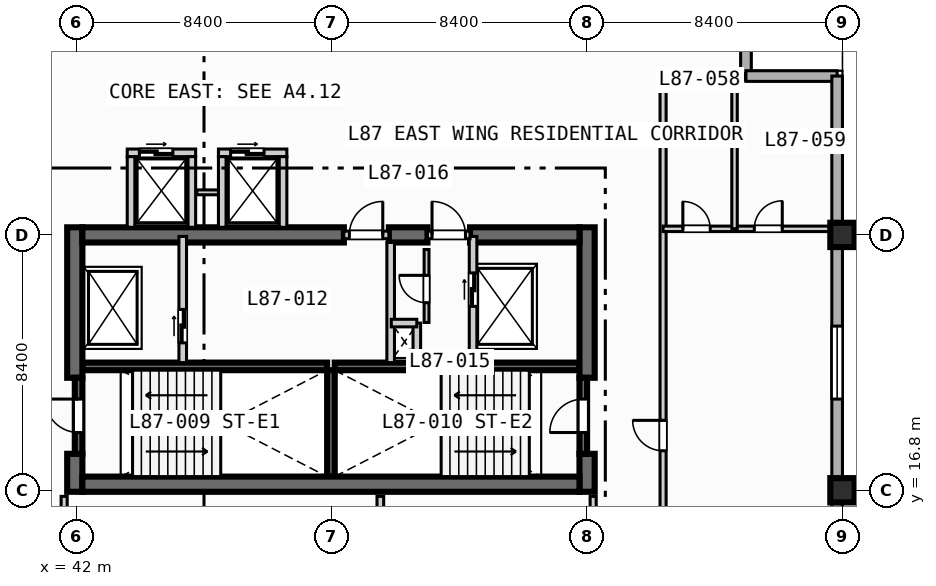
"""IFC4 building model, lengths in metres.
Left out: names, types, materials, properties, quantities, classifications, styles, units other than length and angle.
Written with IfcOpenShell. Run it as: python <this file> out.ifc"""

import sys

from ifc_helpers import new_model, si_unit, direction, frame, frame_2d, origin, origin_2d, place, context, subcontext, project, spatial, rectangle, extrude, element, fill, save


model = new_model("IFC4")
c1 = context("Model", 3, precision=1e-05, world=origin(), true_north=direction((0.0, 1.0)))
c2 = subcontext(c1, "Body", "Model", "MODEL_VIEW")
j1 = project(units=[si_unit("LENGTHUNIT", "METRE"), si_unit("PLANEANGLEUNIT", "RADIAN")], contexts=[c1])
p1 = place(None, origin())
s1 = spatial("IfcSite", under=j1, at=p1, CompositionType="ELEMENT")
p2 = place(p1, origin())
s2 = spatial("IfcBuilding", under=s1, at=p2, CompositionType="ELEMENT")
p3 = place(p2, frame((0.0, 0.0, 351.5)))
s3 = spatial("IfcBuildingStorey", under=s2, at=p3, CompositionType="ELEMENT", Elevation=351.5)
for number, where, z_axis, x_axis in (
    (1, (42.2, 20.875, 0.0), (0.0, 0.0, 1.0), (1.0, 0.0, 0.0)),
    (2, (50.5, 20.875, 0.0), (0.0, 0.0, 1.0), (1.0, 0.0, 0.0)),
):
    element("IfcWall", number, at=place(p3, frame(where, z_axis=z_axis, x_axis=x_axis)), inside=s3, PredefinedType="SOLIDWALL", context=c2, shape_type="SweptSolid", body=[
        extrude(rectangle(XDim=8.05, YDim=0.25, at=frame_2d((4.025, 0.0))), origin(), (0.0, 0.0, 1.0), 3.67),
    ])
p4 = place(p3, frame((50.375, 17.25, 0.0), z_axis=(0.0, 0.0, 1.0), x_axis=(0.0, 1.0, 0.0)))
e3 = element("IfcWall", 3, at=p4, inside=s3, PredefinedType="SOLIDWALL", context=c2, shape_type="SweptSolid", body=[
    extrude(rectangle(XDim=3.5, YDim=0.25, at=frame_2d((1.75, 0.0))), origin(), (0.0, 0.0, 1.0), 3.67),
])
p5 = place(p3, frame((41.95, 16.75, 0.0), z_axis=(0.0, 0.0, 1.0), x_axis=(0.0, 1.0, 0.0)))
e4 = element("IfcWall", 4, at=p5, inside=s3, PredefinedType="SHEAR", context=c2, shape_type="SweptSolid", body=[
    extrude(rectangle(XDim=1.25, YDim=0.5, at=frame_2d((0.625, 0.0))), origin(), (0.0, 0.0, 1.0), 3.67),
])
p6 = place(p3, frame((41.95, 20.5, 0.0), z_axis=(0.0, 0.0, 1.0), x_axis=(0.0, 1.0, 0.0)))
e5 = element("IfcWall", 5, at=p6, inside=s3, PredefinedType="SHEAR", context=c2, shape_type="SweptSolid", body=[
    extrude(rectangle(XDim=4.95, YDim=0.5, at=frame_2d((2.475, 0.0))), origin(), (0.0, 0.0, 1.0), 3.67),
])
p7 = place(p3, frame((58.8, 16.75, 0.0), z_axis=(0.0, 0.0, 1.0), x_axis=(0.0, 1.0, 0.0)))
e6 = element("IfcWall", 6, at=p7, inside=s3, PredefinedType="SHEAR", context=c2, shape_type="SweptSolid", body=[
    extrude(rectangle(XDim=1.25, YDim=0.5, at=frame_2d((0.625, 0.0))), origin(), (0.0, 0.0, 1.0), 3.67),
])
p8 = place(p3, frame((58.8, 20.5, 0.0), z_axis=(0.0, 0.0, 1.0), x_axis=(0.0, 1.0, 0.0)))
e7 = element("IfcWall", 7, at=p8, inside=s3, PredefinedType="SHEAR", context=c2, shape_type="SweptSolid", body=[
    extrude(rectangle(XDim=4.95, YDim=0.5, at=frame_2d((2.475, 0.0))), origin(), (0.0, 0.0, 1.0), 3.67),
])
p9 = place(p3, frame((42.2, 17.0, 0.0), z_axis=(0.0, 0.0, 1.0), x_axis=(1.0, 0.0, 0.0)))
e8 = element("IfcWall", 8, at=p9, inside=s3, PredefinedType="SHEAR", context=c2, shape_type="SweptSolid", body=[
    extrude(rectangle(XDim=16.35, YDim=0.5, at=frame_2d((8.175, 0.0))), origin(), (0.0, 0.0, 1.0), 3.67),
])
p10 = place(p3, frame((42.2, 25.2, 0.0), z_axis=(0.0, 0.0, 1.0), x_axis=(1.0, 0.0, 0.0)))
e9 = element("IfcWall", 9, at=p10, inside=s3, PredefinedType="SHEAR", context=c2, shape_type="SweptSolid", body=[
    extrude(rectangle(XDim=8.6, YDim=0.5, at=frame_2d((4.3, 0.0))), origin(), (0.0, 0.0, 1.0), 3.67),
])
p11 = place(p3, frame((52.28, 25.2, 0.0), z_axis=(0.0, 0.0, 1.0), x_axis=(1.0, 0.0, 0.0)))
e10 = element("IfcWall", 10, at=p11, inside=s3, PredefinedType="SHEAR", context=c2, shape_type="SweptSolid", body=[
    extrude(rectangle(XDim=1.27, YDim=0.5, at=frame_2d((0.635, 0.0))), origin(), (0.0, 0.0, 1.0), 3.67),
])
p12 = place(p3, frame((54.95, 25.2, 0.0), z_axis=(0.0, 0.0, 1.0), x_axis=(1.0, 0.0, 0.0)))
e11 = element("IfcWall", 11, at=p12, inside=s3, PredefinedType="SHEAR", context=c2, shape_type="SweptSolid", body=[
    extrude(rectangle(XDim=3.6, YDim=0.5, at=frame_2d((1.8, 0.0))), origin(), (0.0, 0.0, 1.0), 3.67),
])
for number, where, z_axis, x_axis in (
    (12, (67.2, 16.8, 0.0), (0.0, 0.0, 1.0), (1.0, 0.0, 0.0)),
    (13, (67.2, 25.2, 0.0), (0.0, 0.0, 1.0), (1.0, 0.0, 0.0)),
):
    element("IfcColumn", number, at=place(p3, frame(where, z_axis=z_axis, x_axis=x_axis)), inside=s3, PredefinedType="COLUMN", context=c2, shape_type="SweptSolid", body=[
        extrude(rectangle(XDim=0.8, YDim=0.8, at=origin_2d()), origin(), (0.0, 0.0, 1.0), 3.9),
    ])
for number, where, z_axis, x_axis in (
    (14, (64.025, 33.425, 0.0), (0.0, 0.0, 1.0), (0.0, -1.0, 0.0)),
    (15, (64.025, 30.425, 0.0), (0.0, 0.0, 1.0), (1.0, 0.0, 0.0)),
):
    element("IfcWall", number, at=place(p3, frame(where, z_axis=z_axis, x_axis=x_axis)), inside=s3, PredefinedType="STANDARD", context=c2, shape_type="SweptSolid", body=[
        extrude(rectangle(XDim=3.0, YDim=0.35, at=frame_2d((1.5, 0.0))), origin(), (0.0, 0.0, 1.0), 3.67),
    ])
p13 = place(p3, frame((67.025, 30.425, 0.0), z_axis=(0.0, 0.0, 1.0), x_axis=(0.0, -1.0, 0.0)))
e16 = element("IfcWall", 16, at=p13, inside=s3, PredefinedType="STANDARD", context=c2, shape_type="SweptSolid", body=[
    extrude(rectangle(XDim=18.85, YDim=0.35, at=frame_2d((9.425, 0.0))), origin(), (0.0, 0.0, 1.0), 3.67),
])
p14 = place(p13, frame((8.225, 0.0, 0.85)))
e17 = element("IfcOpeningElement", 17, at=p14, cuts=e16, PredefinedType="OPENING", context=c2, shape_type="SweptSolid", body=[
    extrude(rectangle(XDim=2.4, YDim=1.95, at=frame_2d((1.2, 0.975))), frame((0.0, 0.185, 0.0), z_axis=(0.0, -1.0, 0.0), x_axis=(1.0, 0.0, 0.0)), (0.0, 0.0, 1.0), 0.37),
])
p15 = place(p3, frame((42.075, 18.0, 0.0), z_axis=(0.0, 0.0, 1.0), x_axis=(0.0, 1.0, 0.0)))
e18 = element("IfcWall", 18, at=p15, inside=s3, PredefinedType="SOLIDWALL", context=c2, shape_type="SweptSolid", body=[
    extrude(rectangle(XDim=2.5, YDim=0.25, at=frame_2d((1.25, 0.0))), origin(), (0.0, 0.0, 1.0), 3.67),
])
p16 = place(p15, frame((0.7, 0.0, 0.0)))
e19 = element("IfcOpeningElement", 19, at=p16, cuts=e18, PredefinedType="OPENING", context=c2, shape_type="SweptSolid", body=[
    extrude(rectangle(XDim=1.1, YDim=2.15, at=frame_2d((0.55, 1.075))), frame((0.0, 0.135, 0.0), z_axis=(0.0, -1.0, 0.0), x_axis=(1.0, 0.0, 0.0)), (0.0, 0.0, 1.0), 0.27),
])
p17 = place(p3, frame((58.675, 18.0, 0.0), z_axis=(0.0, 0.0, 1.0), x_axis=(0.0, 1.0, 0.0)))
e20 = element("IfcWall", 20, at=p17, inside=s3, PredefinedType="SOLIDWALL", context=c2, shape_type="SweptSolid", body=[
    extrude(rectangle(XDim=2.5, YDim=0.25, at=frame_2d((1.25, 0.0))), origin(), (0.0, 0.0, 1.0), 3.67),
])
p18 = place(p17, frame((0.7, 0.0, 0.0)))
e21 = element("IfcOpeningElement", 21, at=p18, cuts=e20, PredefinedType="OPENING", context=c2, shape_type="SweptSolid", body=[
    extrude(rectangle(XDim=1.1, YDim=2.15, at=frame_2d((0.55, 1.075))), frame((0.0, 0.135, 0.0), z_axis=(0.0, -1.0, 0.0), x_axis=(1.0, 0.0, 0.0)), (0.0, 0.0, 1.0), 0.27),
])
p19 = place(p3, frame((45.5, 21.0, 0.0), z_axis=(0.0, 0.0, 1.0), x_axis=(0.0, 1.0, 0.0)))
e22 = element("IfcWall", 22, at=p19, inside=s3, PredefinedType="SOLIDWALL", context=c2, shape_type="SweptSolid", body=[
    extrude(rectangle(XDim=4.15, YDim=0.25, at=frame_2d((2.075, 0.0))), origin(), (0.0, 0.0, 1.0), 3.67),
])
p20 = place(p19, frame((0.65, 0.0, 0.0)))
e23 = element("IfcOpeningElement", 23, at=p20, cuts=e22, PredefinedType="OPENING", context=c2, shape_type="SweptSolid", body=[
    extrude(rectangle(XDim=1.1, YDim=2.15, at=frame_2d((0.55, 1.075))), frame((0.0, 0.135, 0.0), z_axis=(0.0, -1.0, 0.0), x_axis=(1.0, 0.0, 0.0)), (0.0, 0.0, 1.0), 0.27),
])
p21 = place(p3, frame((50.8, 25.2, 0.0), z_axis=(0.0, 0.0, 1.0), x_axis=(1.0, 0.0, 0.0)))
e24 = element("IfcWall", 24, at=p21, inside=s3, PredefinedType="SOLIDWALL", context=c2, shape_type="SweptSolid", body=[
    extrude(rectangle(XDim=1.48, YDim=0.25, at=frame_2d((0.74, 0.0))), origin(), (0.0, 0.0, 1.0), 3.67),
])
p22 = place(p21, frame((0.18, 0.0, 0.0)))
e25 = element("IfcOpeningElement", 25, at=p22, cuts=e24, PredefinedType="OPENING", context=c2, shape_type="SweptSolid", body=[
    extrude(rectangle(XDim=1.1, YDim=2.15, at=frame_2d((0.55, 1.075))), frame((0.0, 0.135, 0.0), z_axis=(0.0, -1.0, 0.0), x_axis=(1.0, 0.0, 0.0)), (0.0, 0.0, 1.0), 0.27),
])
p23 = place(p3, frame((52.34, 21.0, 0.0), z_axis=(0.0, 0.0, 1.0), x_axis=(0.0, 1.0, 0.0)))
e26 = element("IfcWall", 26, at=p23, inside=s3, PredefinedType="SOLIDWALL", context=c2, shape_type="SweptSolid", body=[
    extrude(rectangle(XDim=3.95, YDim=0.25, at=frame_2d((1.975, 0.0))), origin(), (0.0, 0.0, 1.0), 3.67),
])
p24 = place(p3, frame((55.05, 21.0, 0.0), z_axis=(0.0, 0.0, 1.0), x_axis=(0.0, 1.0, 0.0)))
e27 = element("IfcWall", 27, at=p24, inside=s3, PredefinedType="SOLIDWALL", context=c2, shape_type="SweptSolid", body=[
    extrude(rectangle(XDim=4.15, YDim=0.25, at=frame_2d((2.075, 0.0))), origin(), (0.0, 0.0, 1.0), 3.67),
])
p25 = place(p24, frame((1.85, 0.0, 0.0)))
e28 = element("IfcOpeningElement", 28, at=p25, cuts=e27, PredefinedType="OPENING", context=c2, shape_type="SweptSolid", body=[
    extrude(rectangle(XDim=1.1, YDim=2.15, at=frame_2d((0.55, 1.075))), frame((0.0, 0.135, 0.0), z_axis=(0.0, -1.0, 0.0), x_axis=(1.0, 0.0, 0.0)), (0.0, 0.0, 1.0), 0.27),
])
p26 = place(p3, frame((53.55, 25.2, 0.0), z_axis=(0.0, 0.0, 1.0), x_axis=(1.0, 0.0, 0.0)))
e29 = element("IfcWall", 29, at=p26, inside=s3, PredefinedType="SOLIDWALL", context=c2, shape_type="SweptSolid", body=[
    extrude(rectangle(XDim=1.4, YDim=0.25, at=frame_2d((0.7, 0.0))), origin(), (0.0, 0.0, 1.0), 3.67),
])
p27 = place(p26, frame((0.15, 0.0, 0.0)))
e30 = element("IfcOpeningElement", 30, at=p27, cuts=e29, PredefinedType="OPENING", context=c2, shape_type="SweptSolid", body=[
    extrude(rectangle(XDim=1.1, YDim=2.15, at=frame_2d((0.55, 1.075))), frame((0.0, 0.135, 0.0), z_axis=(0.0, -1.0, 0.0), x_axis=(1.0, 0.0, 0.0)), (0.0, 0.0, 1.0), 0.27),
])
p28 = place(p3, frame((53.2, 21.0, 0.0), z_axis=(0.0, 0.0, 1.0), x_axis=(0.0, 1.0, 0.0)))
e31 = element("IfcWall", 31, at=p28, inside=s3, PredefinedType="SOLIDWALL", context=c2, shape_type="SweptSolid", body=[
    extrude(rectangle(XDim=1.3, YDim=0.25, at=frame_2d((0.65, 0.0))), origin(), (0.0, 0.0, 1.0), 3.67),
])
p29 = place(p3, frame((52.36, 22.3, 0.0), z_axis=(0.0, 0.0, 1.0), x_axis=(1.0, 0.0, 0.0)))
e32 = element("IfcWall", 32, at=p29, inside=s3, PredefinedType="SOLIDWALL", context=c2, shape_type="SweptSolid", body=[
    extrude(rectangle(XDim=0.84, YDim=0.25, at=frame_2d((0.42, 0.0))), origin(), (0.0, 0.0, 1.0), 3.67),
])
p30 = place(p3, frame((53.52, 22.32, 0.0), z_axis=(0.0, 0.0, 1.0), x_axis=(0.0, 1.0, 0.0)))
e33 = element("IfcWall", 33, at=p30, inside=s3, PredefinedType="PARTITIONING", context=c2, shape_type="SweptSolid", body=[
    extrude(rectangle(XDim=2.4, YDim=0.16, at=frame_2d((1.2, 0.0))), origin(), (0.0, 0.0, 1.0), 3.67),
])
p31 = place(p30, frame((0.65, 0.0, 0.0)))
e34 = element("IfcOpeningElement", 34, at=p31, cuts=e33, PredefinedType="OPENING", context=c2, shape_type="SweptSolid", body=[
    extrude(rectangle(XDim=0.9, YDim=2.1, at=frame_2d((0.45, 1.05))), frame((0.0, 0.09, 0.0), z_axis=(0.0, -1.0, 0.0), x_axis=(1.0, 0.0, 0.0)), (0.0, 0.0, 1.0), 0.18),
])
p32 = place(p3, frame((43.675, 27.9, 0.0), z_axis=(0.0, 0.0, 1.0), x_axis=(1.0, 0.0, 0.0)))
e35 = element("IfcWall", 35, at=p32, inside=s3, PredefinedType="SOLIDWALL", context=c2, shape_type="SweptSolid", body=[
    extrude(rectangle(XDim=2.25, YDim=0.25, at=frame_2d((1.125, 0.0))), origin(), (0.0, 0.0, 1.0), 3.67),
])
p33 = place(p32, frame((0.4, 0.0, 0.0)))
e36 = element("IfcOpeningElement", 36, at=p33, cuts=e35, PredefinedType="OPENING", context=c2, shape_type="SweptSolid", body=[
    extrude(rectangle(XDim=1.1, YDim=2.15, at=frame_2d((0.55, 1.075))), frame((0.0, 0.135, 0.0), z_axis=(0.0, -1.0, 0.0), x_axis=(1.0, 0.0, 0.0)), (0.0, 0.0, 1.0), 0.27),
])
for number, where, z_axis, x_axis in (
    (37, (43.8, 25.45, 0.0), (0.0, 0.0, 1.0), (0.0, 1.0, 0.0)),
    (38, (45.8, 25.45, 0.0), (0.0, 0.0, 1.0), (0.0, 1.0, 0.0)),
):
    element("IfcWall", number, at=place(p3, frame(where, z_axis=z_axis, x_axis=x_axis)), inside=s3, PredefinedType="SOLIDWALL", context=c2, shape_type="SweptSolid", body=[
        extrude(rectangle(XDim=2.325, YDim=0.25, at=frame_2d((1.163, 0.0))), origin(), (0.0, 0.0, 1.0), 3.67),
    ])
p34 = place(p3, frame((45.96, 26.6, 0.0), z_axis=(0.0, 0.0, 1.0), x_axis=(1.0, 0.0, 0.0)))
e39 = element("IfcWall", 39, at=p34, inside=s3, PredefinedType="PARTITIONING", context=c2, shape_type="SweptSolid", body=[
    extrude(rectangle(XDim=0.88, YDim=0.16, at=frame_2d((0.44, 0.0))), origin(), (0.0, 0.0, 1.0), 3.67),
])
p35 = place(p3, frame((46.675, 27.9, 0.0), z_axis=(0.0, 0.0, 1.0), x_axis=(1.0, 0.0, 0.0)))
e40 = element("IfcWall", 40, at=p35, inside=s3, PredefinedType="SOLIDWALL", context=c2, shape_type="SweptSolid", body=[
    extrude(rectangle(XDim=2.25, YDim=0.25, at=frame_2d((1.125, 0.0))), origin(), (0.0, 0.0, 1.0), 3.67),
])
p36 = place(p35, frame((0.4, 0.0, 0.0)))
e41 = element("IfcOpeningElement", 41, at=p36, cuts=e40, PredefinedType="OPENING", context=c2, shape_type="SweptSolid", body=[
    extrude(rectangle(XDim=1.1, YDim=2.15, at=frame_2d((0.55, 1.075))), frame((0.0, 0.135, 0.0), z_axis=(0.0, -1.0, 0.0), x_axis=(1.0, 0.0, 0.0)), (0.0, 0.0, 1.0), 0.27),
])
for number, where, z_axis, x_axis in (
    (42, (46.8, 25.45, 0.0), (0.0, 0.0, 1.0), (0.0, 1.0, 0.0)),
    (43, (48.8, 25.45, 0.0), (0.0, 0.0, 1.0), (0.0, 1.0, 0.0)),
):
    element("IfcWall", number, at=place(p3, frame(where, z_axis=z_axis, x_axis=x_axis)), inside=s3, PredefinedType="SOLIDWALL", context=c2, shape_type="SweptSolid", body=[
        extrude(rectangle(XDim=2.325, YDim=0.25, at=frame_2d((1.163, 0.0))), origin(), (0.0, 0.0, 1.0), 3.67),
    ])
p37 = place(p3, frame((41.6, 8.65, 0.0), z_axis=(0.0, 0.0, 1.0), x_axis=(0.0, 1.0, 0.0)))
e44 = element("IfcWall", 44, at=p37, inside=s3, PredefinedType="PARTITIONING", context=c2, shape_type="SweptSolid", body=[
    extrude(rectangle(XDim=7.95, YDim=0.2, at=frame_2d((3.975, 0.0))), origin(), (0.0, 0.0, 1.0), 3.67),
])
p38 = place(p37, frame((2.2, 0.0, 0.0)))
e45 = element("IfcOpeningElement", 45, at=p38, cuts=e44, PredefinedType="OPENING", context=c2, shape_type="SweptSolid", body=[
    extrude(rectangle(XDim=0.92, YDim=2.1, at=frame_2d((0.46, 1.05))), frame((0.0, 0.11, 0.0), z_axis=(0.0, -1.0, 0.0), x_axis=(1.0, 0.0, 0.0)), (0.0, 0.0, 1.0), 0.22),
])
p39 = place(p3, frame((59.0, 8.65, 0.0), z_axis=(0.0, 0.0, 1.0), x_axis=(0.0, 1.0, 0.0)))
e46 = element("IfcWall", 46, at=p39, inside=s3, PredefinedType="PARTITIONING", context=c2, shape_type="SweptSolid", body=[
    extrude(rectangle(XDim=7.95, YDim=0.2, at=frame_2d((3.975, 0.0))), origin(), (0.0, 0.0, 1.0), 3.07),
])
p40 = place(p39, frame((2.2, 0.0, 0.0)))
e47 = element("IfcOpeningElement", 47, at=p40, cuts=e46, PredefinedType="OPENING", context=c2, shape_type="SweptSolid", body=[
    extrude(rectangle(XDim=0.92, YDim=2.1, at=frame_2d((0.46, 1.05))), frame((0.0, 0.11, 0.0), z_axis=(0.0, -1.0, 0.0), x_axis=(1.0, 0.0, 0.0)), (0.0, 0.0, 1.0), 0.22),
])
p41 = place(p3, frame((52.0, 8.65, 0.0), z_axis=(0.0, 0.0, 1.0), x_axis=(0.0, 1.0, 0.0)))
e48 = element("IfcWall", 48, at=p41, inside=s3, PredefinedType="PARTITIONING", context=c2, shape_type="SweptSolid", body=[
    extrude(rectangle(XDim=7.95, YDim=0.22, at=frame_2d((3.975, 0.0))), origin(), (0.0, 0.0, 1.0), 3.67),
])
p42 = place(p3, frame((61.3, 11.6, 0.0), z_axis=(0.0, 0.0, 1.0), x_axis=(0.0, 1.0, 0.0)))
e49 = element("IfcWall", 49, at=p42, inside=s3, PredefinedType="PARTITIONING", context=c2, shape_type="SweptSolid", body=[
    extrude(rectangle(XDim=18.8, YDim=0.2, at=frame_2d((9.4, 0.0))), origin(), (0.0, 0.0, 1.0), 3.67),
])
p43 = place(p42, frame((6.5, 0.0, 0.0)))
e50 = element("IfcOpeningElement", 50, at=p43, cuts=e49, PredefinedType="OPENING", context=c2, shape_type="SweptSolid", body=[
    extrude(rectangle(XDim=1.0, YDim=2.15, at=frame_2d((0.5, 1.075))), frame((0.0, 0.11, 0.0), z_axis=(0.0, -1.0, 0.0), x_axis=(1.0, 0.0, 0.0)), (0.0, 0.0, 1.0), 0.22),
])
p44 = place(p3, frame((61.3, 25.4, 0.0), z_axis=(0.0, 0.0, 1.0), x_axis=(1.0, 0.0, 0.0)))
e51 = element("IfcWall", 51, at=p44, inside=s3, PredefinedType="PLUMBINGWALL", context=c2, shape_type="SweptSolid", body=[
    extrude(rectangle(XDim=5.5, YDim=0.18, at=frame_2d((2.75, 0.0))), origin(), (0.0, 0.0, 1.0), 3.127),
])
p45 = place(p44, frame((0.65, 0.0, 0.0)))
e52 = element("IfcOpeningElement", 52, at=p45, cuts=e51, PredefinedType="OPENING", context=c2, shape_type="SweptSolid", body=[
    extrude(rectangle(XDim=0.9, YDim=2.1, at=frame_2d((0.45, 1.05))), frame((0.0, 0.1, 0.0), z_axis=(0.0, -1.0, 0.0), x_axis=(1.0, 0.0, 0.0)), (0.0, 0.0, 1.0), 0.2),
])
p46 = place(p44, frame((3.0, 0.0, 0.0)))
e53 = element("IfcOpeningElement", 53, at=p46, cuts=e51, PredefinedType="OPENING", context=c2, shape_type="SweptSolid", body=[
    extrude(rectangle(XDim=0.92, YDim=2.1, at=frame_2d((0.46, 1.05))), frame((0.0, 0.1, 0.0), z_axis=(0.0, -1.0, 0.0), x_axis=(1.0, 0.0, 0.0)), (0.0, 0.0, 1.0), 0.2),
])
p47 = place(p3, frame((63.65, 25.4, 0.0), z_axis=(0.0, 0.0, 1.0), x_axis=(0.0, 1.0, 0.0)))
e54 = element("IfcWall", 54, at=p47, inside=s3, PredefinedType="PLUMBINGWALL", context=c2, shape_type="SweptSolid", body=[
    extrude(rectangle(XDim=5.0, YDim=0.18, at=frame_2d((2.5, 0.0))), origin(), (0.0, 0.0, 1.0), 3.67),
])
p48 = place(p3, frame((61.3, 30.4, 0.0), z_axis=(0.0, 0.0, 1.0), x_axis=(1.0, 0.0, 0.0)))
e55 = element("IfcWall", 55, at=p48, inside=s3, PredefinedType="PARTITIONING", context=c2, shape_type="SweptSolid", body=[
    extrude(rectangle(XDim=2.7, YDim=0.22, at=frame_2d((1.35, 0.0))), origin(), (0.0, 0.0, 1.0), 3.67),
])
p49 = place(p14, origin())
e56 = element("IfcWindow", 56, at=p49, inside=s3, PartitioningType="SINGLE_PANEL", PredefinedType="WINDOW", context=c2, shape_type="SweptSolid", body=[
    extrude(rectangle(XDim=2.4, YDim=1.95, at=frame_2d((1.2, 0.975))), frame((0.0, 0.03, 0.0), z_axis=(0.0, -1.0, 0.0), x_axis=(1.0, 0.0, 0.0)), (0.0, 0.0, 1.0), 0.06),
])
fill(e17, e56)
p50 = place(p16, origin())
e57 = element("IfcDoor", 57, at=p50, inside=s3, OperationType="SINGLE_SWING_RIGHT", PredefinedType="DOOR", context=c2, shape_type="SweptSolid", body=[
    extrude(rectangle(XDim=1.1, YDim=2.15, at=frame_2d((0.55, 1.075))), frame((0.0, 0.025, 0.0), z_axis=(0.0, -1.0, 0.0), x_axis=(1.0, 0.0, 0.0)), (0.0, 0.0, 1.0), 0.05),
])
fill(e19, e57)
p51 = place(p18, origin())
e58 = element("IfcDoor", 58, at=p51, inside=s3, OperationType="SINGLE_SWING_LEFT", PredefinedType="DOOR", context=c2, shape_type="SweptSolid", body=[
    extrude(rectangle(XDim=1.1, YDim=2.15, at=frame_2d((0.55, 1.075))), frame((0.0, 0.025, 0.0), z_axis=(0.0, -1.0, 0.0), x_axis=(1.0, 0.0, 0.0)), (0.0, 0.0, 1.0), 0.05),
])
fill(e21, e58)
p52 = place(p20, origin())
e59 = element("IfcDoor", 59, at=p52, inside=s3, OperationType="SLIDING_TO_LEFT", PredefinedType="DOOR", context=c2, shape_type="SweptSolid", body=[
    extrude(rectangle(XDim=1.1, YDim=2.15, at=frame_2d((0.55, 1.075))), frame((0.0, 0.025, 0.0), z_axis=(0.0, -1.0, 0.0), x_axis=(1.0, 0.0, 0.0)), (0.0, 0.0, 1.0), 0.05),
])
fill(e23, e59)
p53 = place(p22, origin())
e60 = element("IfcDoor", 60, at=p53, inside=s3, OperationType="SINGLE_SWING_RIGHT", PredefinedType="DOOR", context=c2, shape_type="SweptSolid", body=[
    extrude(rectangle(XDim=1.1, YDim=2.15, at=frame_2d((0.55, 1.075))), frame((0.0, 0.025, 0.0), z_axis=(0.0, -1.0, 0.0), x_axis=(1.0, 0.0, 0.0)), (0.0, 0.0, 1.0), 0.05),
])
fill(e25, e60)
p54 = place(p25, origin())
e61 = element("IfcDoor", 61, at=p54, inside=s3, OperationType="SLIDING_TO_LEFT", PredefinedType="DOOR", context=c2, shape_type="SweptSolid", body=[
    extrude(rectangle(XDim=1.1, YDim=2.15, at=frame_2d((0.55, 1.075))), frame((0.0, 0.025, 0.0), z_axis=(0.0, -1.0, 0.0), x_axis=(1.0, 0.0, 0.0)), (0.0, 0.0, 1.0), 0.05),
])
fill(e28, e61)
p55 = place(p27, origin())
e62 = element("IfcDoor", 62, at=p55, inside=s3, OperationType="SINGLE_SWING_LEFT", PredefinedType="DOOR", context=c2, shape_type="SweptSolid", body=[
    extrude(rectangle(XDim=1.1, YDim=2.15, at=frame_2d((0.55, 1.075))), frame((0.0, 0.025, 0.0), z_axis=(0.0, -1.0, 0.0), x_axis=(1.0, 0.0, 0.0)), (0.0, 0.0, 1.0), 0.05),
])
fill(e30, e62)
p56 = place(p31, origin())
e63 = element("IfcDoor", 63, at=p56, inside=s3, OperationType="SINGLE_SWING_RIGHT", PredefinedType="DOOR", context=c2, shape_type="SweptSolid", body=[
    extrude(rectangle(XDim=0.9, YDim=2.1, at=frame_2d((0.45, 1.05))), frame((0.0, 0.025, 0.0), z_axis=(0.0, -1.0, 0.0), x_axis=(1.0, 0.0, 0.0)), (0.0, 0.0, 1.0), 0.05),
])
fill(e34, e63)
p57 = place(p33, origin())
e64 = element("IfcDoor", 64, at=p57, inside=s3, OperationType="SLIDING_TO_LEFT", PredefinedType="DOOR", context=c2, shape_type="SweptSolid", body=[
    extrude(rectangle(XDim=1.1, YDim=2.15, at=frame_2d((0.55, 1.075))), frame((0.0, 0.025, 0.0), z_axis=(0.0, -1.0, 0.0), x_axis=(1.0, 0.0, 0.0)), (0.0, 0.0, 1.0), 0.05),
])
fill(e36, e64)
p58 = place(p36, origin())
e65 = element("IfcDoor", 65, at=p58, inside=s3, OperationType="SLIDING_TO_LEFT", PredefinedType="DOOR", context=c2, shape_type="SweptSolid", body=[
    extrude(rectangle(XDim=1.1, YDim=2.15, at=frame_2d((0.55, 1.075))), frame((0.0, 0.025, 0.0), z_axis=(0.0, -1.0, 0.0), x_axis=(1.0, 0.0, 0.0)), (0.0, 0.0, 1.0), 0.05),
])
fill(e41, e65)
p59 = place(p43, origin())
e66 = element("IfcDoor", 66, at=p59, inside=s3, OperationType="SINGLE_SWING_RIGHT", PredefinedType="DOOR", context=c2, shape_type="SweptSolid", body=[
    extrude(rectangle(XDim=1.0, YDim=2.15, at=frame_2d((0.5, 1.075))), frame((0.0, 0.025, 0.0), z_axis=(0.0, -1.0, 0.0), x_axis=(1.0, 0.0, 0.0)), (0.0, 0.0, 1.0), 0.05),
])
fill(e50, e66)
p60 = place(p45, origin())
e67 = element("IfcDoor", 67, at=p60, inside=s3, OperationType="SINGLE_SWING_LEFT", PredefinedType="DOOR", context=c2, shape_type="SweptSolid", body=[
    extrude(rectangle(XDim=0.9, YDim=2.1, at=frame_2d((0.45, 1.05))), frame((0.0, 0.025, 0.0), z_axis=(0.0, -1.0, 0.0), x_axis=(1.0, 0.0, 0.0)), (0.0, 0.0, 1.0), 0.05),
])
fill(e52, e67)
p61 = place(p46, origin())
e68 = element("IfcDoor", 68, at=p61, inside=s3, OperationType="SINGLE_SWING_RIGHT", PredefinedType="DOOR", context=c2, shape_type="SweptSolid", body=[
    extrude(rectangle(XDim=0.92, YDim=2.1, at=frame_2d((0.46, 1.05))), frame((0.0, 0.025, 0.0), z_axis=(0.0, -1.0, 0.0), x_axis=(1.0, 0.0, 0.0)), (0.0, 0.0, 1.0), 0.05),
])
fill(e53, e68)
save(model, sys.argv[1])
